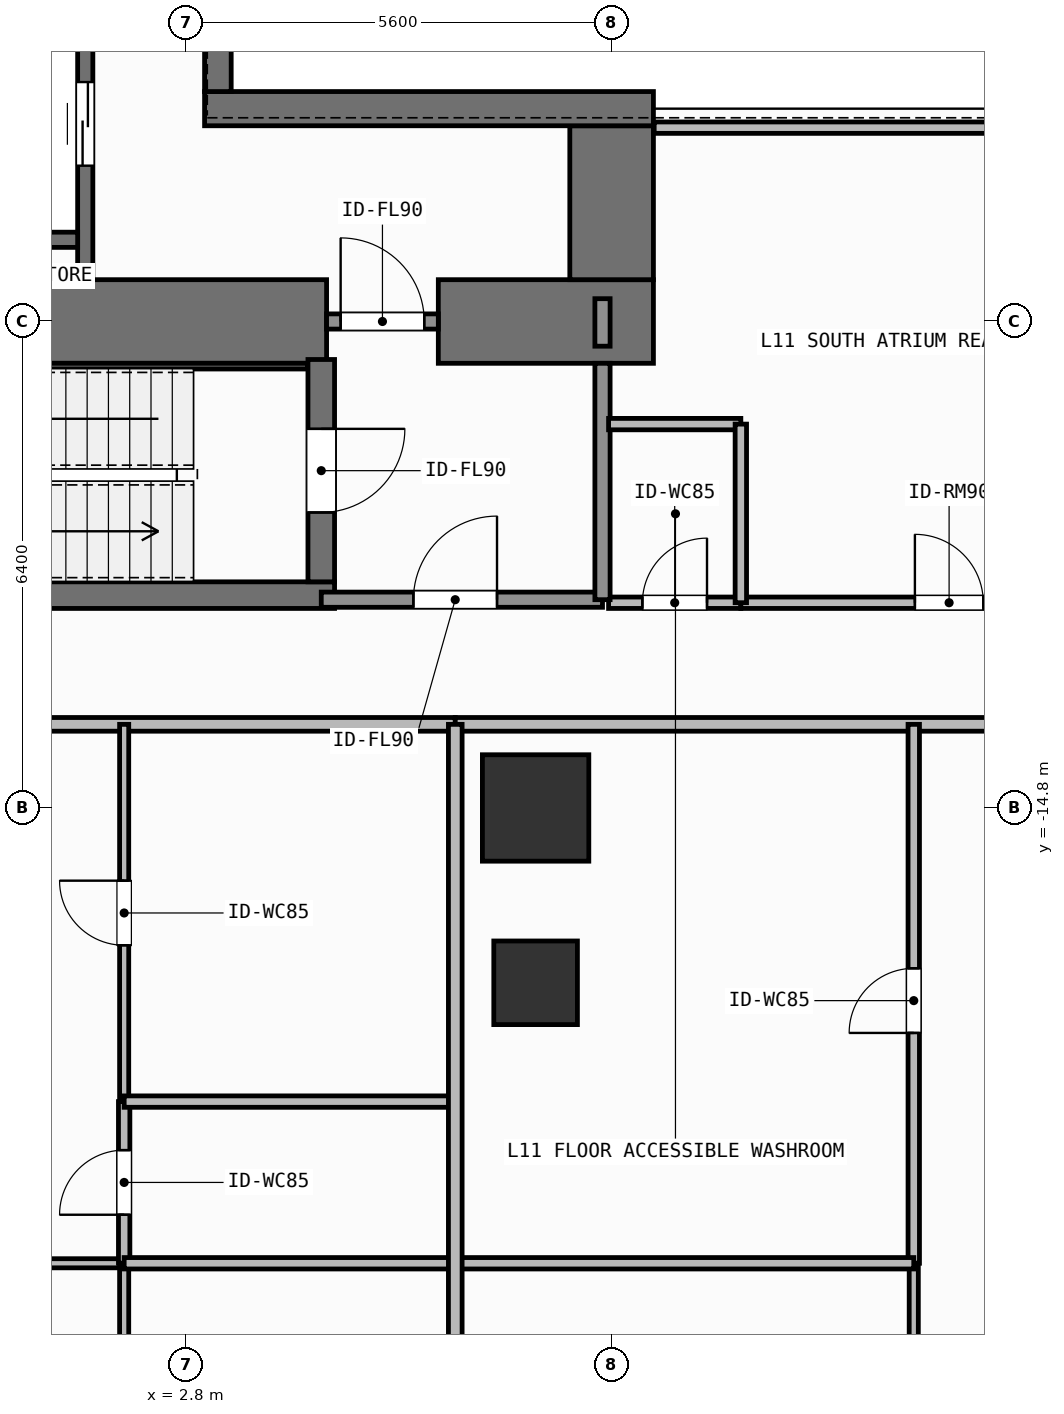
"""IFC4 building model, lengths in metres.
Left out: names, types, materials, properties, quantities, classifications, styles, units other than length and angle.
Written with IfcOpenShell. Run it as: python <this file> out.ifc"""

import sys

from ifc_helpers import new_model, si_unit, direction, frame, frame_2d, origin, origin_2d, place, context, subcontext, project, spatial, rectangle, extrude, element, fill, save


model = new_model("IFC4")
c1 = context("Model", 3, precision=1e-05, world=origin(), true_north=direction((0.0, 1.0)))
c2 = subcontext(c1, "Body", "Model", "MODEL_VIEW")
j1 = project(units=[si_unit("LENGTHUNIT", "METRE"), si_unit("PLANEANGLEUNIT", "RADIAN")], contexts=[c1])
p1 = place(None, origin())
s1 = spatial("IfcSite", under=j1, at=p1, CompositionType="ELEMENT")
p2 = place(p1, origin())
s2 = spatial("IfcBuilding", under=s1, at=p2, CompositionType="ELEMENT")
p3 = place(p2, frame((0.0, 0.0, 42.3)))
s3 = spatial("IfcBuildingStorey", under=s2, at=p3, CompositionType="ELEMENT", Elevation=42.3)
p4 = place(p3, frame((-2.62, -8.4, 0.0), z_axis=(0.0, 0.0, 1.0), x_axis=(1.0, 0.0, 0.0)))
e1 = element("IfcWall", 1, at=p4, inside=s3, PredefinedType="SHEAR", context=c2, shape_type="SweptSolid", body=[
    extrude(rectangle(XDim=7.27, YDim=1.1, at=frame_2d((3.635, 0.0))), origin(), (0.0, 0.0, 1.0), 3.9),
])
p5 = place(p3, frame((6.12, -8.4, 0.0), z_axis=(0.0, 0.0, 1.0), x_axis=(1.0, 0.0, 0.0)))
e2 = element("IfcWall", 2, at=p5, inside=s3, PredefinedType="SHEAR", context=c2, shape_type="SweptSolid", body=[
    extrude(rectangle(XDim=2.83, YDim=1.1, at=frame_2d((1.415, 0.0))), origin(), (0.0, 0.0, 1.0), 3.9),
])
p6 = place(p3, frame((8.4, -7.85, 0.0), z_axis=(0.0, 0.0, 1.0), x_axis=(0.0, 1.0, 0.0)))
e3 = element("IfcWall", 3, at=p6, inside=s3, PredefinedType="SHEAR", context=c2, shape_type="SweptSolid", body=[
    extrude(rectangle(XDim=2.025, YDim=1.1, at=frame_2d((1.013, 0.0))), origin(), (0.0, 0.0, 1.0), 3.9),
])
p7 = place(p3, frame((3.045, -5.6, 0.0), z_axis=(0.0, 0.0, 1.0), x_axis=(1.0, 0.0, 0.0)))
e4 = element("IfcWall", 4, at=p7, inside=s3, PredefinedType="SHEAR", context=c2, shape_type="SweptSolid", body=[
    extrude(rectangle(XDim=5.905, YDim=0.45, at=frame_2d((2.953, 0.0))), origin(), (0.0, 0.0, 1.0), 3.9),
])
p8 = place(p3, frame((3.22, -5.375, 0.0), z_axis=(0.0, 0.0, 1.0), x_axis=(0.0, 1.0, 0.0)))
e5 = element("IfcWall", 5, at=p8, inside=s3, PredefinedType="SHEAR", context=c2, shape_type="SweptSolid", body=[
    extrude(rectangle(XDim=10.75, YDim=0.35, at=frame_2d((5.375, 0.0))), origin(), (0.0, 0.0, 1.0), 3.9),
])
p9 = place(p3, frame((-2.555, -12.0, 0.0), z_axis=(0.0, 0.0, 1.0), x_axis=(1.0, 0.0, 0.0)))
e6 = element("IfcWall", 6, at=p9, inside=s3, PredefinedType="SHEAR", context=c2, shape_type="SweptSolid", body=[
    extrude(rectangle(XDim=7.31, YDim=0.35, at=frame_2d((3.655, 0.0))), origin(), (0.0, 0.0, 1.0), 3.9),
])
p10 = place(p3, frame((-2.2, -8.988, 0.0), z_axis=(0.0, 0.0, 1.0), x_axis=(1.0, 0.0, 0.0)))
e7 = element("IfcWall", 7, at=p10, inside=s3, PredefinedType="SHEAR", context=c2, shape_type="SweptSolid", body=[
    extrude(rectangle(XDim=6.6, YDim=0.075, at=frame_2d((3.3, 0.0))), origin(), (0.0, 0.0, 1.0), 3.9),
])
p11 = place(p3, frame((4.58, -8.9, 0.0), z_axis=(0.0, 0.0, 1.0), x_axis=(0.0, -1.0, 0.0)))
e8 = element("IfcWall", 8, at=p11, inside=s3, PredefinedType="SHEAR", context=c2, shape_type="SweptSolid", body=[
    extrude(rectangle(XDim=2.925, YDim=0.35, at=frame_2d((1.462, 0.0))), origin(), (0.0, 0.0, 1.0), 3.9),
])
p12 = place(p11, frame((0.913, 0.0, 0.0)))
e9 = element("IfcOpeningElement", 9, at=p12, cuts=e8, PredefinedType="OPENING", context=c2, shape_type="SweptSolid", body=[
    extrude(rectangle(XDim=1.1, YDim=2.15, at=frame_2d((0.55, 1.075))), frame((0.0, 0.185, 0.0), z_axis=(0.0, -1.0, 0.0), x_axis=(1.0, 0.0, 0.0)), (0.0, 0.0, 1.0), 0.37),
])
p13 = place(p3, frame((7.4, -14.8, 0.0), z_axis=(0.0, 0.0, 1.0), x_axis=(1.0, 0.0, 0.0)))
e10 = element("IfcColumn", 10, at=p13, inside=s3, PredefinedType="COLUMN", context=c2, shape_type="SweptSolid", body=[
    extrude(rectangle(XDim=1.4, YDim=1.4, at=origin_2d()), origin(), (0.0, 0.0, 1.0), 3.9),
])
p14 = place(p3, frame((7.4, -17.1, 0.0), z_axis=(0.0, 0.0, 1.0), x_axis=(1.0, 0.0, 0.0)))
e11 = element("IfcColumn", 11, at=p14, inside=s3, PredefinedType="COLUMN", context=c2, shape_type="SweptSolid", body=[
    extrude(rectangle(XDim=1.1, YDim=1.1, at=origin_2d()), origin(), (0.0, 0.0, 1.0), 3.9),
])
p15 = place(p3, frame((1.475, -7.85, 0.0), z_axis=(0.0, 0.0, 1.0), x_axis=(0.0, 1.0, 0.0)))
e12 = element("IfcWall", 12, at=p15, inside=s3, PredefinedType="SHEAR", context=c2, shape_type="SweptSolid", body=[
    extrude(rectangle(XDim=3.575, YDim=0.2, at=frame_2d((1.788, 0.0))), origin(), (0.0, 0.0, 1.0), 3.68),
])
p16 = place(p15, frame((1.5, 0.0, 0.0)))
e13 = element("IfcOpeningElement", 13, at=p16, cuts=e12, PredefinedType="OPENING", context=c2, shape_type="SweptSolid", body=[
    extrude(rectangle(XDim=1.1, YDim=2.2, at=frame_2d((0.55, 1.1))), frame((0.0, 0.11, 0.0), z_axis=(0.0, -1.0, 0.0), x_axis=(1.0, 0.0, 0.0)), (0.0, 0.0, 1.0), 0.22),
])
p17 = place(p3, frame((-0.975, -7.325, 0.0), z_axis=(0.0, 0.0, 1.0), x_axis=(1.0, 0.0, 0.0)))
e14 = element("IfcWall", 14, at=p17, inside=s3, PredefinedType="SHEAR", context=c2, shape_type="SweptSolid", body=[
    extrude(rectangle(XDim=2.35, YDim=0.2, at=frame_2d((1.175, 0.0))), origin(), (0.0, 0.0, 1.0), 3.68),
])
p18 = place(p3, frame((4.58, -12.06, 0.0), z_axis=(0.0, 0.0, 1.0), x_axis=(1.0, 0.0, 0.0)))
e15 = element("IfcWall", 15, at=p18, inside=s3, PredefinedType="SOLIDWALL", context=c2, shape_type="SweptSolid", body=[
    extrude(rectangle(XDim=3.7, YDim=0.2, at=frame_2d((1.85, 0.0))), origin(), (0.0, 0.0, 1.0), 3.68),
])
p19 = place(p18, frame((1.212, 0.0, 0.0)))
e16 = element("IfcOpeningElement", 16, at=p19, cuts=e15, PredefinedType="OPENING", context=c2, shape_type="SweptSolid", body=[
    extrude(rectangle(XDim=1.1, YDim=2.15, at=frame_2d((0.55, 1.075))), frame((0.0, 0.11, 0.0), z_axis=(0.0, -1.0, 0.0), x_axis=(1.0, 0.0, 0.0)), (0.0, 0.0, 1.0), 0.22),
])
p20 = place(p3, frame((4.65, -8.4, 0.0), z_axis=(0.0, 0.0, 1.0), x_axis=(1.0, 0.0, 0.0)))
e17 = element("IfcWall", 17, at=p20, inside=s3, PredefinedType="SOLIDWALL", context=c2, shape_type="SweptSolid", body=[
    extrude(rectangle(XDim=1.47, YDim=0.2, at=frame_2d((0.735, 0.0))), origin(), (0.0, 0.0, 1.0), 2.72),
])
p21 = place(p20, frame((0.185, 0.0, 0.0)))
e18 = element("IfcOpeningElement", 18, at=p21, cuts=e17, PredefinedType="OPENING", context=c2, shape_type="SweptSolid", body=[
    extrude(rectangle(XDim=1.1, YDim=2.15, at=frame_2d((0.55, 1.075))), frame((0.0, 0.11, 0.0), z_axis=(0.0, -1.0, 0.0), x_axis=(1.0, 0.0, 0.0)), (0.0, 0.0, 1.0), 0.22),
])
p22 = place(p3, frame((8.36, -12.1, 0.0), z_axis=(0.0, 0.0, 1.0), x_axis=(1.0, 0.0, 0.0)))
e19 = element("IfcWall", 19, at=p22, inside=s3, PredefinedType="PARTITIONING", context=c2, shape_type="SweptSolid", body=[
    extrude(rectangle(XDim=1.74, YDim=0.15, at=frame_2d((0.87, 0.0))), origin(), (0.0, 0.0, 1.0), 3.68),
])
p23 = place(p22, frame((0.445, 0.0, 0.0)))
e20 = element("IfcOpeningElement", 20, at=p23, cuts=e19, PredefinedType="OPENING", context=c2, shape_type="SweptSolid", body=[
    extrude(rectangle(XDim=0.85, YDim=2.1, at=frame_2d((0.425, 1.05))), frame((0.0, 0.085, 0.0), z_axis=(0.0, -1.0, 0.0), x_axis=(1.0, 0.0, 0.0)), (0.0, 0.0, 1.0), 0.17),
])
p24 = place(p3, frame((10.1, -12.1, 0.0), z_axis=(0.0, 0.0, 1.0), x_axis=(1.0, 0.0, 0.0)))
e21 = element("IfcWall", 21, at=p24, inside=s3, PredefinedType="PARTITIONING", context=c2, shape_type="SweptSolid", body=[
    extrude(rectangle(XDim=5.48, YDim=0.15, at=frame_2d((2.74, 0.0))), origin(), (0.0, 0.0, 1.0), 3.68),
])
p25 = place(p24, frame((2.29, 0.0, 0.0)))
e22 = element("IfcOpeningElement", 22, at=p25, cuts=e21, PredefinedType="OPENING", context=c2, shape_type="SweptSolid", body=[
    extrude(rectangle(XDim=0.9, YDim=2.1, at=frame_2d((0.45, 1.05))), frame((0.0, 0.085, 0.0), z_axis=(0.0, -1.0, 0.0), x_axis=(1.0, 0.0, 0.0)), (0.0, 0.0, 1.0), 0.17),
])
p26 = place(p3, frame((-18.62, -13.7, 0.0), z_axis=(0.0, 0.0, 1.0), x_axis=(1.0, 0.0, 0.0)))
e23 = element("IfcWall", 23, at=p26, inside=s3, PredefinedType="PARTITIONING", context=c2, shape_type="SweptSolid", body=[
    extrude(rectangle(XDim=24.963, YDim=0.18, at=frame_2d((12.481, 0.0))), origin(), (0.0, 0.0, 1.0), 3.68),
])
p27 = place(p26, frame((11.981, 0.0, 0.0)))
e24 = element("IfcOpeningElement", 24, at=p27, cuts=e23, PredefinedType="OPENING", context=c2, shape_type="SweptSolid", body=[
    extrude(rectangle(XDim=1.0, YDim=2.2, at=frame_2d((0.5, 1.1))), frame((0.0, 0.1, 0.0), z_axis=(0.0, -1.0, 0.0), x_axis=(1.0, 0.0, 0.0)), (0.0, 0.0, 1.0), 0.2),
])
p28 = place(p3, frame((-5.425, -20.79, 0.0), z_axis=(0.0, 0.0, 1.0), x_axis=(1.0, 0.0, 0.0)))
e25 = element("IfcWall", 25, at=p28, inside=s3, PredefinedType="PARTITIONING", context=c2, shape_type="SweptSolid", body=[
    extrude(rectangle(XDim=7.412, YDim=0.12, at=frame_2d((3.706, 0.0))), origin(), (0.0, 0.0, 1.0), 3.68),
])
p29 = place(p28, frame((3.344, 0.0, 0.0)))
e26 = element("IfcOpeningElement", 26, at=p29, cuts=e25, PredefinedType="OPENING", context=c2, shape_type="SweptSolid", body=[
    extrude(rectangle(XDim=0.9, YDim=2.1, at=frame_2d((0.45, 1.05))), frame((0.0, 0.07, 0.0), z_axis=(0.0, -1.0, 0.0), x_axis=(1.0, 0.0, 0.0)), (0.0, 0.0, 1.0), 0.14),
])
p30 = place(p3, frame((1.987, -20.79, 0.0), z_axis=(0.0, 0.0, 1.0), x_axis=(0.0, 1.0, 0.0)))
e27 = element("IfcWall", 27, at=p30, inside=s3, PredefinedType="PARTITIONING", context=c2, shape_type="SweptSolid", body=[
    extrude(rectangle(XDim=2.127, YDim=0.15, at=frame_2d((1.063, 0.0))), origin(), (0.0, 0.0, 1.0), 3.68),
])
p31 = place(p30, frame((0.638, 0.0, 0.0)))
e28 = element("IfcOpeningElement", 28, at=p31, cuts=e27, PredefinedType="OPENING", context=c2, shape_type="SweptSolid", body=[
    extrude(rectangle(XDim=0.85, YDim=2.1, at=frame_2d((0.425, 1.05))), frame((0.0, 0.085, 0.0), z_axis=(0.0, -1.0, 0.0), x_axis=(1.0, 0.0, 0.0)), (0.0, 0.0, 1.0), 0.17),
])
p32 = place(p3, frame((1.987, -18.663, 0.0), z_axis=(0.0, 0.0, 1.0), x_axis=(0.0, 1.0, 0.0)))
e29 = element("IfcWall", 29, at=p32, inside=s3, PredefinedType="PARTITIONING", context=c2, shape_type="SweptSolid", body=[
    extrude(rectangle(XDim=4.963, YDim=0.12, at=frame_2d((2.481, 0.0))), origin(), (0.0, 0.0, 1.0), 3.68),
])
p33 = place(p32, frame((2.056, 0.0, 0.0)))
e30 = element("IfcOpeningElement", 30, at=p33, cuts=e29, PredefinedType="OPENING", context=c2, shape_type="SweptSolid", body=[
    extrude(rectangle(XDim=0.85, YDim=2.1, at=frame_2d((0.425, 1.05))), frame((0.0, 0.07, 0.0), z_axis=(0.0, -1.0, 0.0), x_axis=(1.0, 0.0, 0.0)), (0.0, 0.0, 1.0), 0.14),
])
p34 = place(p3, frame((1.987, -25.03, 0.0), z_axis=(0.0, 0.0, 1.0), x_axis=(0.0, 1.0, 0.0)))
e31 = element("IfcWall", 31, at=p34, inside=s3, PredefinedType="PARTITIONING", context=c2, shape_type="SweptSolid", body=[
    extrude(rectangle(XDim=4.24, YDim=0.12, at=frame_2d((2.12, 0.0))), origin(), (0.0, 0.0, 1.0), 3.68),
])
p35 = place(p34, frame((1.581, 0.0, 0.0)))
e32 = element("IfcOpeningElement", 32, at=p35, cuts=e31, PredefinedType="OPENING", context=c2, shape_type="SweptSolid", body=[
    extrude(rectangle(XDim=0.9, YDim=2.1, at=frame_2d((0.45, 1.05))), frame((0.0, 0.07, 0.0), z_axis=(0.0, -1.0, 0.0), x_axis=(1.0, 0.0, 0.0)), (0.0, 0.0, 1.0), 0.14),
])
p36 = place(p3, frame((6.343, -13.7, 0.0), z_axis=(0.0, 0.0, 1.0), x_axis=(1.0, 0.0, 0.0)))
e33 = element("IfcWall", 33, at=p36, inside=s3, PredefinedType="PARTITIONING", context=c2, shape_type="SweptSolid", body=[
    extrude(rectangle(XDim=18.077, YDim=0.18, at=frame_2d((9.039, 0.0))), origin(), (0.0, 0.0, 1.0), 3.68),
])
p37 = place(p36, frame((9.252, 0.0, 0.0)))
e34 = element("IfcOpeningElement", 34, at=p37, cuts=e33, PredefinedType="OPENING", context=c2, shape_type="SweptSolid", body=[
    extrude(rectangle(XDim=1.0, YDim=2.2, at=frame_2d((0.5, 1.1))), frame((0.0, 0.1, 0.0), z_axis=(0.0, -1.0, 0.0), x_axis=(1.0, 0.0, 0.0)), (0.0, 0.0, 1.0), 0.2),
])
p38 = place(p3, frame((12.375, -20.79, 0.0), z_axis=(0.0, 0.0, 1.0), x_axis=(0.0, 1.0, 0.0)))
e35 = element("IfcWall", 35, at=p38, inside=s3, PredefinedType="PARTITIONING", context=c2, shape_type="SweptSolid", body=[
    extrude(rectangle(XDim=7.09, YDim=0.15, at=frame_2d((3.545, 0.0))), origin(), (0.0, 0.0, 1.0), 3.68),
])
p39 = place(p38, frame((3.03, 0.0, 0.0)))
e36 = element("IfcOpeningElement", 36, at=p39, cuts=e35, PredefinedType="OPENING", context=c2, shape_type="SweptSolid", body=[
    extrude(rectangle(XDim=0.85, YDim=2.1, at=frame_2d((0.425, 1.05))), frame((0.0, 0.085, 0.0), z_axis=(0.0, -1.0, 0.0), x_axis=(1.0, 0.0, 0.0)), (0.0, 0.0, 1.0), 0.17),
])
p40 = place(p3, frame((12.375, -25.03, 0.0), z_axis=(0.0, 0.0, 1.0), x_axis=(0.0, 1.0, 0.0)))
e37 = element("IfcWall", 37, at=p40, inside=s3, PredefinedType="PARTITIONING", context=c2, shape_type="SweptSolid", body=[
    extrude(rectangle(XDim=4.24, YDim=0.12, at=frame_2d((2.12, 0.0))), origin(), (0.0, 0.0, 1.0), 3.68),
])
p41 = place(p40, frame((1.581, 0.0, 0.0)))
e38 = element("IfcOpeningElement", 38, at=p41, cuts=e37, PredefinedType="OPENING", context=c2, shape_type="SweptSolid", body=[
    extrude(rectangle(XDim=0.9, YDim=2.1, at=frame_2d((0.45, 1.05))), frame((0.0, 0.07, 0.0), z_axis=(0.0, -1.0, 0.0), x_axis=(1.0, 0.0, 0.0)), (0.0, 0.0, 1.0), 0.14),
])
p42 = place(p3, frame((8.28, -12.06, 0.0), z_axis=(0.0, 0.0, 1.0), x_axis=(0.0, 1.0, 0.0)))
e39 = element("IfcWall", 39, at=p42, inside=s3, PredefinedType="SOLIDWALL", context=c2, shape_type="SweptSolid", body=[
    extrude(rectangle(XDim=3.11, YDim=0.2, at=frame_2d((1.555, 0.0))), origin(), (0.0, 0.0, 1.0), 3.68),
])
p43 = place(p3, frame((8.28, -8.725, 0.0), z_axis=(0.0, 0.0, 1.0), x_axis=(0.0, 1.0, 0.0)))
e40 = element("IfcWall", 40, at=p43, inside=s3, PredefinedType="SOLIDWALL", context=c2, shape_type="SweptSolid", body=[
    extrude(rectangle(XDim=0.625, YDim=0.2, at=frame_2d((0.312, 0.0))), origin(), (0.0, 0.0, 1.0), 3.68),
])
p44 = place(p3, frame((8.36, -9.75, 0.0), z_axis=(0.0, 0.0, 1.0), x_axis=(1.0, 0.0, 0.0)))
e41 = element("IfcWall", 41, at=p44, inside=s3, PredefinedType="PARTITIONING", context=c2, shape_type="SweptSolid", body=[
    extrude(rectangle(XDim=1.74, YDim=0.15, at=frame_2d((0.87, 0.0))), origin(), (0.0, 0.0, 1.0), 3.68),
])
p45 = place(p3, frame((10.1, -12.1, 0.0), z_axis=(0.0, 0.0, 1.0), x_axis=(0.0, 1.0, 0.0)))
e42 = element("IfcWall", 42, at=p45, inside=s3, PredefinedType="PARTITIONING", context=c2, shape_type="SweptSolid", body=[
    extrude(rectangle(XDim=2.35, YDim=0.15, at=frame_2d((1.175, 0.0))), origin(), (0.0, 0.0, 1.0), 3.68),
])
p46 = place(p3, frame((8.96, -5.85, 0.0), z_axis=(0.0, 0.0, 1.0), x_axis=(1.0, 0.0, 0.0)))
e43 = element("IfcWall", 43, at=p46, inside=s3, PredefinedType="PARTITIONING", context=c2, shape_type="SweptSolid", body=[
    extrude(rectangle(XDim=6.62, YDim=0.15, at=frame_2d((3.31, 0.0))), origin(), (0.0, 0.0, 1.0), 3.68),
])
for number, where, z_axis, x_axis in (
    (44, (1.987, -18.663, 0.0), (0.0, 0.0, 1.0), (1.0, 0.0, 0.0)),
    (45, (1.987, -20.79, 0.0), (0.0, 0.0, 1.0), (1.0, 0.0, 0.0)),
):
    element("IfcWall", number, at=place(p3, frame(where, z_axis=z_axis, x_axis=x_axis)), inside=s3, PredefinedType="PARTITIONING", context=c2, shape_type="SweptSolid", body=[
        extrude(rectangle(XDim=4.356, YDim=0.15, at=frame_2d((2.178, 0.0))), origin(), (0.0, 0.0, 1.0), 3.68),
    ])
p47 = place(p3, frame((6.343, -20.79, 0.0), z_axis=(0.0, 0.0, 1.0), x_axis=(1.0, 0.0, 0.0)))
e46 = element("IfcWall", 46, at=p47, inside=s3, PredefinedType="PARTITIONING", context=c2, shape_type="SweptSolid", body=[
    extrude(rectangle(XDim=6.032, YDim=0.15, at=frame_2d((3.016, 0.0))), origin(), (0.0, 0.0, 1.0), 3.68),
])
p48 = place(p3, frame((6.343, -25.03, 0.0), z_axis=(0.0, 0.0, 1.0), x_axis=(0.0, 1.0, 0.0)))
e47 = element("IfcWall", 47, at=p48, inside=s3, PredefinedType="PARTITIONING", context=c2, shape_type="SweptSolid", body=[
    extrude(rectangle(XDim=11.33, YDim=0.18, at=frame_2d((5.665, 0.0))), origin(), (0.0, 0.0, 1.0), 3.68),
])
p49 = place(p16, origin())
e48 = element("IfcDoor", 48, at=p49, inside=s3, OperationType="SLIDING_TO_LEFT", PredefinedType="DOOR", context=c2, shape_type="SweptSolid", body=[
    extrude(rectangle(XDim=1.1, YDim=2.2, at=frame_2d((0.55, 1.1))), frame((0.0, 0.025, 0.0), z_axis=(0.0, -1.0, 0.0), x_axis=(1.0, 0.0, 0.0)), (0.0, 0.0, 1.0), 0.05),
])
fill(e13, e48)
p50 = place(p12, origin())
e49 = element("IfcDoor", 49, at=p50, inside=s3, OperationType="SINGLE_SWING_LEFT", PredefinedType="DOOR", context=c2, shape_type="SweptSolid", body=[
    extrude(rectangle(XDim=1.1, YDim=2.15, at=frame_2d((0.55, 1.075))), frame((0.0, 0.025, 0.0), z_axis=(0.0, -1.0, 0.0), x_axis=(1.0, 0.0, 0.0)), (0.0, 0.0, 1.0), 0.05),
])
fill(e9, e49)
p51 = place(p19, origin())
e50 = element("IfcDoor", 50, at=p51, inside=s3, OperationType="SINGLE_SWING_RIGHT", PredefinedType="DOOR", context=c2, shape_type="SweptSolid", body=[
    extrude(rectangle(XDim=1.1, YDim=2.15, at=frame_2d((0.55, 1.075))), frame((0.0, 0.025, 0.0), z_axis=(0.0, -1.0, 0.0), x_axis=(1.0, 0.0, 0.0)), (0.0, 0.0, 1.0), 0.05),
])
fill(e16, e50)
p52 = place(p21, origin())
e51 = element("IfcDoor", 51, at=p52, inside=s3, OperationType="SINGLE_SWING_LEFT", PredefinedType="DOOR", context=c2, shape_type="SweptSolid", body=[
    extrude(rectangle(XDim=1.1, YDim=2.15, at=frame_2d((0.55, 1.075))), frame((0.0, 0.025, 0.0), z_axis=(0.0, -1.0, 0.0), x_axis=(1.0, 0.0, 0.0)), (0.0, 0.0, 1.0), 0.05),
])
fill(e18, e51)
p53 = place(p23, origin())
e52 = element("IfcDoor", 52, at=p53, inside=s3, OperationType="SINGLE_SWING_RIGHT", PredefinedType="DOOR", context=c2, shape_type="SweptSolid", body=[
    extrude(rectangle(XDim=0.85, YDim=2.1, at=frame_2d((0.425, 1.05))), frame((0.0, 0.025, 0.0), z_axis=(0.0, -1.0, 0.0), x_axis=(1.0, 0.0, 0.0)), (0.0, 0.0, 1.0), 0.05),
])
fill(e20, e52)
p54 = place(p25, origin())
e53 = element("IfcDoor", 53, at=p54, inside=s3, OperationType="SINGLE_SWING_LEFT", PredefinedType="DOOR", context=c2, shape_type="SweptSolid", body=[
    extrude(rectangle(XDim=0.9, YDim=2.1, at=frame_2d((0.45, 1.05))), frame((0.0, 0.025, 0.0), z_axis=(0.0, -1.0, 0.0), x_axis=(1.0, 0.0, 0.0)), (0.0, 0.0, 1.0), 0.05),
])
fill(e22, e53)
p55 = place(p31, origin())
e54 = element("IfcDoor", 54, at=p55, inside=s3, OperationType="SINGLE_SWING_LEFT", PredefinedType="DOOR", context=c2, shape_type="SweptSolid", body=[
    extrude(rectangle(XDim=0.85, YDim=2.1, at=frame_2d((0.425, 1.05))), frame((0.0, 0.025, 0.0), z_axis=(0.0, -1.0, 0.0), x_axis=(1.0, 0.0, 0.0)), (0.0, 0.0, 1.0), 0.05),
])
fill(e28, e54)
p56 = place(p33, origin())
e55 = element("IfcDoor", 55, at=p56, inside=s3, OperationType="SINGLE_SWING_RIGHT", PredefinedType="DOOR", context=c2, shape_type="SweptSolid", body=[
    extrude(rectangle(XDim=0.85, YDim=2.1, at=frame_2d((0.425, 1.05))), frame((0.0, 0.025, 0.0), z_axis=(0.0, -1.0, 0.0), x_axis=(1.0, 0.0, 0.0)), (0.0, 0.0, 1.0), 0.05),
])
fill(e30, e55)
p57 = place(p39, origin())
e56 = element("IfcDoor", 56, at=p57, inside=s3, OperationType="SINGLE_SWING_LEFT", PredefinedType="DOOR", context=c2, shape_type="SweptSolid", body=[
    extrude(rectangle(XDim=0.85, YDim=2.1, at=frame_2d((0.425, 1.05))), frame((0.0, 0.025, 0.0), z_axis=(0.0, -1.0, 0.0), x_axis=(1.0, 0.0, 0.0)), (0.0, 0.0, 1.0), 0.05),
])
fill(e36, e56)
save(model, sys.argv[1])
